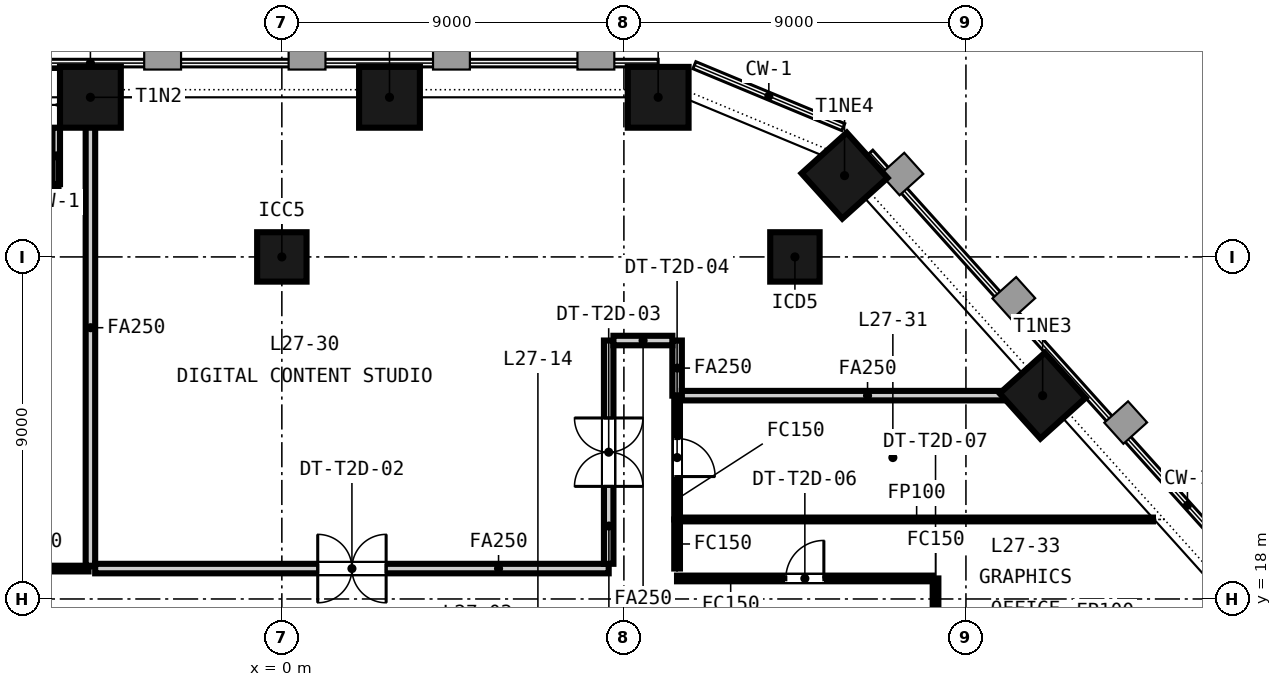
"""IFC4 building model, lengths in metres.
Left out: names, types, materials, properties, quantities, classifications, styles, units other than length and angle.
Written with IfcOpenShell. Run it as: python <this file> out.ifc"""

import sys

from ifc_helpers import new_model, si_unit, direction, frame, frame_2d, origin, origin_2d, place, context, subcontext, project, spatial, rectangle, extrude, element, fill, save


model = new_model("IFC4")
c1 = context("Model", 3, precision=1e-05, world=origin(), true_north=direction((0.0, 1.0)))
c2 = subcontext(c1, "Body", "Model", "MODEL_VIEW")
j1 = project(units=[si_unit("LENGTHUNIT", "METRE"), si_unit("PLANEANGLEUNIT", "RADIAN")], contexts=[c1])
p1 = place(None, origin())
s1 = spatial("IfcSite", under=j1, at=p1, CompositionType="ELEMENT")
p2 = place(p1, origin())
s2 = spatial("IfcBuilding", under=s1, at=p2, CompositionType="ELEMENT")
p3 = place(p2, frame((0.0, 0.0, 113.5)))
s3 = spatial("IfcBuildingStorey", under=s2, at=p3, CompositionType="ELEMENT", Elevation=113.5)
for number, where, z_axis, x_axis in (
    (1, (9.902, 31.2, -0.15), (0.0, 0.0, 1.0), (-1.0, 0.0, 0.0)),
    (2, (2.832, 31.2, -0.15), (0.0, 0.0, 1.0), (-1.0, 0.0, 0.0)),
    (3, (-5.037, 31.2, -0.15), (0.0, 0.0, 1.0), (-1.0, 0.0, 0.0)),
    (4, (20.018, 23.35, -0.15), (0.0, 0.0, 1.0), (-0.669, 0.743, 0.0)),
    (5, (14.806, 29.139, -0.15), (0.0, 0.0, 1.0), (-0.669, 0.743, 0.0)),
):
    element("IfcColumn", number, at=place(p3, frame(where, z_axis=z_axis, x_axis=x_axis)), inside=s3, PredefinedType="COLUMN", context=c2, shape_type="SweptSolid", body=[
        extrude(rectangle(XDim=1.6, YDim=1.6, at=origin_2d()), origin(), (0.0, 0.0, 1.0), 3.5),
    ])
for number, where, z_axis, x_axis in (
    (6, (0.0, 27.0, -0.15), (0.0, 0.0, 1.0), (1.0, 0.0, 0.0)),
    (7, (13.5, 27.0, -0.15), (0.0, 0.0, 1.0), (1.0, 0.0, 0.0)),
):
    element("IfcColumn", number, at=place(p3, frame(where, z_axis=z_axis, x_axis=x_axis)), inside=s3, PredefinedType="COLUMN", context=c2, shape_type="SweptSolid", body=[
        extrude(rectangle(XDim=1.3, YDim=1.3, at=origin_2d()), origin(), (0.0, 0.0, 1.0), 3.5),
    ])
p4 = place(p3, frame((-5.937, 30.4, 0.0), z_axis=(0.0, 0.0, 1.0), x_axis=(0.0, -1.0, 0.0)))
e8 = element("IfcWall", 8, at=p4, inside=s3, PredefinedType="SOLIDWALL", context=c2, shape_type="SweptSolid", body=[
    extrude(rectangle(XDim=1.484, YDim=0.2, at=frame_2d((0.742, 0.0))), origin(), (0.0, 0.0, 1.0), 2.9),
])
p5 = place(p3, frame((10.4, 24.8, 0.0), z_axis=(0.0, 0.0, 1.0), x_axis=(0.0, -1.0, 0.0)))
e9 = element("IfcWall", 9, at=p5, inside=s3, PredefinedType="PARTITIONING", context=c2, shape_type="SweptSolid", body=[
    extrude(rectangle(XDim=1.45, YDim=0.25, at=frame_2d((0.725, 0.0))), origin(), (0.0, 0.0, 1.0), 2.591),
])
p6 = place(p3, frame((10.4, 23.35, 0.0), z_axis=(0.0, 0.0, 1.0), x_axis=(0.0, -1.0, 0.0)))
e10 = element("IfcWall", 10, at=p6, inside=s3, PredefinedType="PARTITIONING", context=c2, shape_type="SweptSolid", body=[
    extrude(rectangle(XDim=3.258, YDim=0.15, at=frame_2d((1.629, 0.0))), origin(), (0.0, 0.0, 1.0), 2.591),
])
p7 = place(p6, frame((1.129, 0.0, 0.0)))
e11 = element("IfcOpeningElement", 11, at=p7, cuts=e10, PredefinedType="OPENING", context=c2, shape_type="SweptSolid", body=[
    extrude(rectangle(XDim=1.0, YDim=2.1, at=frame_2d((0.5, 1.05))), frame((0.0, 0.085, 0.0), z_axis=(0.0, -1.0, 0.0), x_axis=(1.0, 0.0, 0.0)), (0.0, 0.0, 1.0), 0.17),
])
p8 = place(p3, frame((10.4, 20.092, 0.0), z_axis=(0.0, 0.0, 1.0), x_axis=(0.0, -1.0, 0.0)))
e12 = element("IfcWall", 12, at=p8, inside=s3, PredefinedType="PARTITIONING", context=c2, shape_type="SweptSolid", body=[
    extrude(rectangle(XDim=1.29, YDim=0.15, at=frame_2d((0.645, 0.0))), origin(), (0.0, 0.0, 1.0), 2.591),
])
p9 = place(p3, frame((17.2, 18.54, 0.0), z_axis=(0.0, 0.0, 1.0), x_axis=(0.0, -1.0, 0.0)))
e13 = element("IfcWall", 13, at=p9, inside=s3, PredefinedType="PARTITIONING", context=c2, shape_type="SweptSolid", body=[
    extrude(rectangle(XDim=1.573, YDim=0.15, at=frame_2d((0.787, 0.0))), origin(), (0.0, 0.0, 1.0), 2.591),
])
p10 = place(p3, frame((-8.025, 18.8, 0.0), z_axis=(0.0, 0.0, 1.0), x_axis=(1.0, 0.0, 0.0)))
e14 = element("IfcWall", 14, at=p10, inside=s3, PredefinedType="PARTITIONING", context=c2, shape_type="SweptSolid", body=[
    extrude(rectangle(XDim=2.938, YDim=0.15, at=frame_2d((1.469, 0.0))), origin(), (0.0, 0.0, 1.0), 2.591),
])
p11 = place(p3, frame((-5.037, 18.875, 0.0), z_axis=(0.0, 0.0, 1.0), x_axis=(0.0, 1.0, 0.0)))
e15 = element("IfcWall", 15, at=p11, inside=s3, PredefinedType="PARTITIONING", context=c2, shape_type="SweptSolid", body=[
    extrude(rectangle(XDim=12.525, YDim=0.25, at=frame_2d((6.262, 0.0))), origin(), (0.0, 0.0, 1.0), 2.591),
])
p12 = place(p3, frame((-4.912, 18.8, 0.0), z_axis=(0.0, 0.0, 1.0), x_axis=(1.0, 0.0, 0.0)))
e16 = element("IfcWall", 16, at=p12, inside=s3, PredefinedType="PARTITIONING", context=c2, shape_type="SweptSolid", body=[
    extrude(rectangle(XDim=13.512, YDim=0.25, at=frame_2d((6.756, 0.0))), origin(), (0.0, 0.0, 1.0), 2.591),
])
p13 = place(p12, frame((5.856, 0.0, 0.0)))
e17 = element("IfcOpeningElement", 17, at=p13, cuts=e16, PredefinedType="OPENING", context=c2, shape_type="SweptSolid", body=[
    extrude(rectangle(XDim=1.8, YDim=2.1, at=frame_2d((0.9, 1.05))), frame((0.0, 0.135, 0.0), z_axis=(0.0, -1.0, 0.0), x_axis=(1.0, 0.0, 0.0)), (0.0, 0.0, 1.0), 0.27),
])
p14 = place(p3, frame((8.6, 18.925, 0.0), z_axis=(0.0, 0.0, 1.0), x_axis=(0.0, 1.0, 0.0)))
e18 = element("IfcWall", 18, at=p14, inside=s3, PredefinedType="PARTITIONING", context=c2, shape_type="SweptSolid", body=[
    extrude(rectangle(XDim=5.875, YDim=0.25, at=frame_2d((2.938, 0.0))), origin(), (0.0, 0.0, 1.0), 2.591),
])
p15 = place(p14, frame((2.038, 0.0, 0.0)))
e19 = element("IfcOpeningElement", 19, at=p15, cuts=e18, PredefinedType="OPENING", context=c2, shape_type="SweptSolid", body=[
    extrude(rectangle(XDim=1.8, YDim=2.1, at=frame_2d((0.9, 1.05))), frame((0.0, 0.135, 0.0), z_axis=(0.0, -1.0, 0.0), x_axis=(1.0, 0.0, 0.0)), (0.0, 0.0, 1.0), 0.27),
])
p16 = place(p3, frame((8.725, 24.8, 0.0), z_axis=(0.0, 0.0, 1.0), x_axis=(1.0, 0.0, 0.0)))
e20 = element("IfcWall", 20, at=p16, inside=s3, PredefinedType="PARTITIONING", context=c2, shape_type="SweptSolid", body=[
    extrude(rectangle(XDim=1.55, YDim=0.25, at=frame_2d((0.775, 0.0))), origin(), (0.0, 0.0, 1.0), 2.591),
])
p17 = place(p3, frame((10.525, 23.35, 0.0), z_axis=(0.0, 0.0, 1.0), x_axis=(1.0, 0.0, 0.0)))
e21 = element("IfcWall", 21, at=p17, inside=s3, PredefinedType="PARTITIONING", context=c2, shape_type="SweptSolid", body=[
    extrude(rectangle(XDim=9.762, YDim=0.25, at=frame_2d((4.881, 0.0))), origin(), (0.0, 0.0, 1.0), 2.591),
])
p18 = place(p3, frame((10.475, 20.092, 0.0), z_axis=(0.0, 0.0, 1.0), x_axis=(1.0, 0.0, 0.0)))
e22 = element("IfcWall", 22, at=p18, inside=s3, PredefinedType="PARTITIONING", context=c2, shape_type="SweptSolid", body=[
    extrude(rectangle(XDim=12.446, YDim=0.1, at=frame_2d((6.223, 0.0))), origin(), (0.0, 0.0, 1.0), 2.591),
])
p19 = place(p3, frame((10.398, 18.54, 0.0), z_axis=(0.0, 0.0, 1.0), x_axis=(1.0, 0.0, 0.0)))
e23 = element("IfcWall", 23, at=p19, inside=s3, PredefinedType="PARTITIONING", context=c2, shape_type="SweptSolid", body=[
    extrude(rectangle(XDim=6.727, YDim=0.15, at=frame_2d((3.364, 0.0))), origin(), (0.0, 0.0, 1.0), 2.591),
])
p20 = place(p19, frame((2.864, 0.0, 0.0)))
e24 = element("IfcOpeningElement", 24, at=p20, cuts=e23, PredefinedType="OPENING", context=c2, shape_type="SweptSolid", body=[
    extrude(rectangle(XDim=1.0, YDim=2.1, at=frame_2d((0.5, 1.05))), frame((0.0, 0.085, 0.0), z_axis=(0.0, -1.0, 0.0), x_axis=(1.0, 0.0, 0.0)), (0.0, 0.0, 1.0), 0.17),
])
p21 = place(p13, origin())
e25 = element("IfcDoor", 25, at=p21, inside=s3, OperationType="DOUBLE_DOOR_DOUBLE_SWING", PredefinedType="DOOR", context=c2, shape_type="SweptSolid", body=[
    extrude(rectangle(XDim=1.8, YDim=2.1, at=frame_2d((0.9, 1.05))), frame((0.0, 0.025, 0.0), z_axis=(0.0, -1.0, 0.0), x_axis=(1.0, 0.0, 0.0)), (0.0, 0.0, 1.0), 0.05),
])
fill(e17, e25)
p22 = place(p15, origin())
e26 = element("IfcDoor", 26, at=p22, inside=s3, OperationType="DOUBLE_DOOR_DOUBLE_SWING", PredefinedType="DOOR", context=c2, shape_type="SweptSolid", body=[
    extrude(rectangle(XDim=1.8, YDim=2.1, at=frame_2d((0.9, 1.05))), frame((0.0, 0.025, 0.0), z_axis=(0.0, -1.0, 0.0), x_axis=(1.0, 0.0, 0.0)), (0.0, 0.0, 1.0), 0.05),
])
fill(e19, e26)
p23 = place(p7, origin())
e27 = element("IfcDoor", 27, at=p23, inside=s3, OperationType="SINGLE_SWING_RIGHT", PredefinedType="DOOR", context=c2, shape_type="SweptSolid", body=[
    extrude(rectangle(XDim=1.0, YDim=2.1, at=frame_2d((0.5, 1.05))), frame((0.0, 0.025, 0.0), z_axis=(0.0, -1.0, 0.0), x_axis=(1.0, 0.0, 0.0)), (0.0, 0.0, 1.0), 0.05),
])
fill(e11, e27)
p24 = place(p20, origin())
e28 = element("IfcDoor", 28, at=p24, inside=s3, OperationType="SINGLE_SWING_RIGHT", PredefinedType="DOOR", context=c2, shape_type="SweptSolid", body=[
    extrude(rectangle(XDim=1.0, YDim=2.1, at=frame_2d((0.5, 1.05))), frame((0.0, 0.025, 0.0), z_axis=(0.0, -1.0, 0.0), x_axis=(1.0, 0.0, 0.0)), (0.0, 0.0, 1.0), 0.05),
])
fill(e24, e28)
save(model, sys.argv[1])
